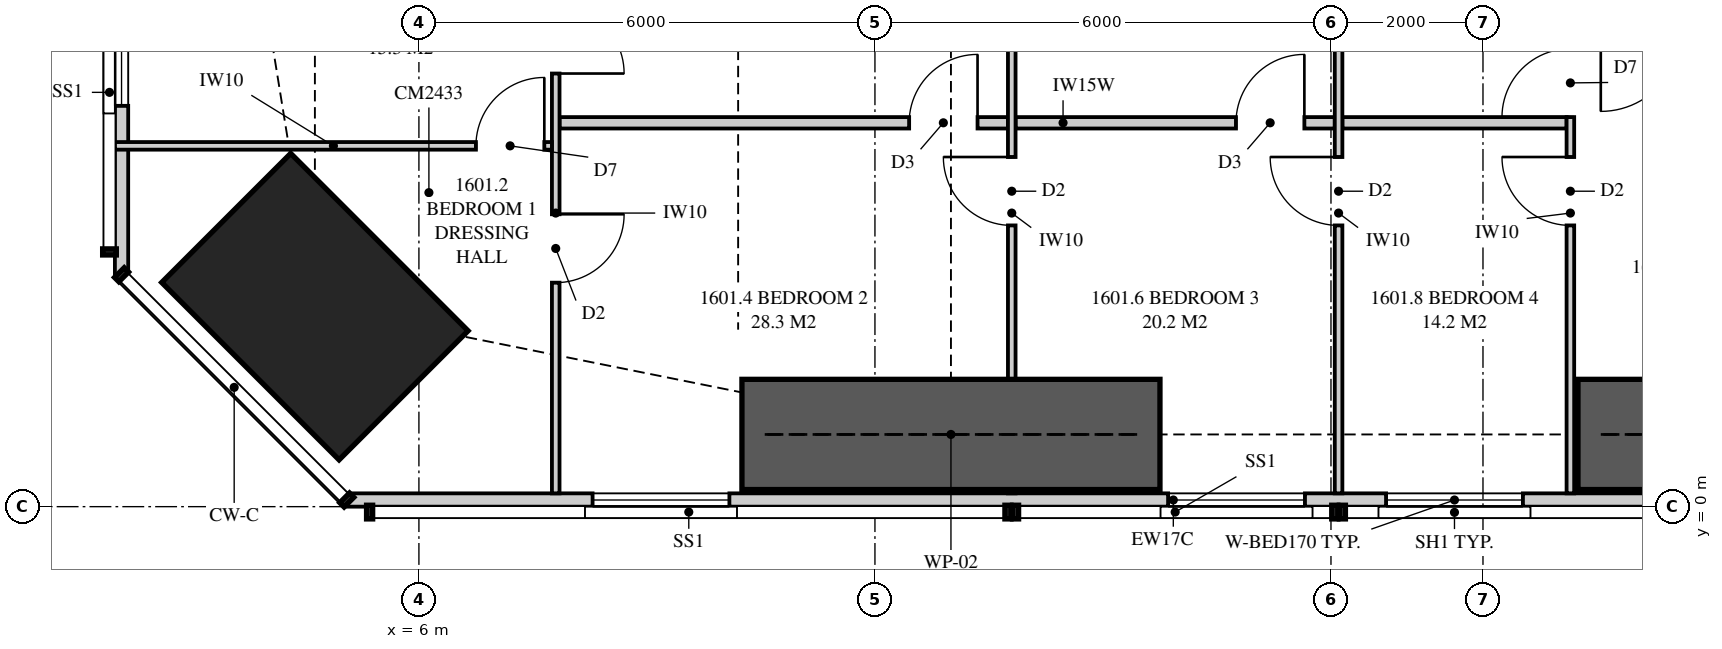
"""IFC4 building model, lengths in metres.
Left out: names, types, materials, properties, quantities, classifications, styles, units other than length and angle.
Written with IfcOpenShell. Run it as: python <this file> out.ifc"""

import sys

from ifc_helpers import new_model, si_unit, direction, frame, frame_2d, origin, origin_2d, place, context, subcontext, project, spatial, polyline, rectangle, outline, extrude, element, fill, save


model = new_model("IFC4")
c1 = context("Model", 3, precision=1e-05, world=origin(), true_north=direction((0.0, 1.0)))
c2 = subcontext(c1, "Body", "Model", "MODEL_VIEW")
j1 = project(units=[si_unit("LENGTHUNIT", "METRE"), si_unit("PLANEANGLEUNIT", "RADIAN")], contexts=[c1])
p1 = place(None, origin())
s1 = spatial("IfcSite", under=j1, at=p1, CompositionType="ELEMENT")
p2 = place(p1, origin())
s2 = spatial("IfcBuilding", under=s1, at=p2, CompositionType="ELEMENT")
p3 = place(p2, frame((0.0, 0.0, 61.2)))
s3 = spatial("IfcBuildingStorey", under=s2, at=p3, CompositionType="ELEMENT", Elevation=61.2)
p4 = place(p3, frame((4.631, 2.631, 0.0), z_axis=(0.0, 0.0, 1.0), x_axis=(0.707106781187, 0.707106781187, 0.0)))
e1 = element("IfcColumn", 1, at=p4, inside=s3, PredefinedType="COLUMN", context=c2, shape_type="SweptSolid", body=[
    extrude(rectangle(XDim=2.4, YDim=3.3, at=origin_2d()), origin(), (0.0, 0.0, 1.0), 3.35),
])
p5 = place(p3, frame((5.051, 0.087, 0.0), z_axis=(0.0, 0.0, 1.0), x_axis=(1.0, 0.0, 0.0)))
e2 = element("IfcWall", 2, at=p5, inside=s3, PredefinedType="SOLIDWALL", context=c2, shape_type="SweptSolid", body=[
    extrude(outline(polyline([(0.0, 0.0), (21.749, 0.0), (21.749, 2.15), (7.949, 2.15), (7.949, 3.11), (7.793, 3.11), (7.793, 2.15), (7.745, 2.15), (7.745, 3.11), (0.0, 3.11), (0.0, 0.0)])), frame((0.0, 0.087, 0.0), z_axis=(0.0, -1.0, 0.0), x_axis=(1.0, 0.0, 0.0)), (0.0, 0.0, 1.0), 0.175),
])
p6 = place(p5, frame((3.234, 0.0, 0.4)))
e3 = element("IfcOpeningElement", 3, at=p6, cuts=e2, PredefinedType="OPENING", context=c2, shape_type="SweptSolid", body=[
    extrude(rectangle(XDim=1.8, YDim=1.7, at=frame_2d((0.9, 0.85))), frame((0.0, 0.097, 0.0), z_axis=(0.0, -1.0, 0.0), x_axis=(1.0, 0.0, 0.0)), (0.0, 0.0, 1.0), 0.195),
])
p7 = place(p5, frame((10.806, 0.0, 0.4)))
e4 = element("IfcOpeningElement", 4, at=p7, cuts=e2, PredefinedType="OPENING", context=c2, shape_type="SweptSolid", body=[
    extrude(rectangle(XDim=1.8, YDim=1.7, at=frame_2d((0.9, 0.85))), frame((0.0, 0.097, 0.0), z_axis=(0.0, -1.0, 0.0), x_axis=(1.0, 0.0, 0.0)), (0.0, 0.0, 1.0), 0.195),
])
p8 = place(p5, frame((13.674, 0.0, 0.4)))
e5 = element("IfcOpeningElement", 5, at=p8, cuts=e2, PredefinedType="OPENING", context=c2, shape_type="SweptSolid", body=[
    extrude(rectangle(XDim=1.8, YDim=1.7, at=frame_2d((0.9, 0.85))), frame((0.0, 0.097, 0.0), z_axis=(0.0, -1.0, 0.0), x_axis=(1.0, 0.0, 0.0)), (0.0, 0.0, 1.0), 0.195),
])
p9 = place(p3, frame((2.087, 16.3, 0.0), z_axis=(0.0, 0.0, 1.0), x_axis=(0.0, -1.0, 0.0)))
e6 = element("IfcWall", 6, at=p9, inside=s3, PredefinedType="SOLIDWALL", context=c2, shape_type="SweptSolid", body=[
    extrude(outline(polyline([(0.0, 0.0), (13.249, 0.0), (13.249, 3.11), (3.519, 3.11), (3.519, 2.15), (3.426, 2.15), (3.426, 3.11), (3.3, 3.11), (3.3, 2.15), (0.0, 2.15), (0.0, 0.0)])), frame((0.0, 0.087, 0.0), z_axis=(0.0, -1.0, 0.0), x_axis=(1.0, 0.0, 0.0)), (0.0, 0.0, 1.0), 0.175),
])
p10 = place(p9, frame((6.175, 0.0, 0.4)))
e7 = element("IfcOpeningElement", 7, at=p10, cuts=e6, PredefinedType="OPENING", context=c2, shape_type="SweptSolid", body=[
    extrude(rectangle(XDim=1.8, YDim=1.7, at=frame_2d((0.9, 0.85))), frame((0.0, 0.097, 0.0), z_axis=(0.0, -1.0, 0.0), x_axis=(1.0, 0.0, 0.0)), (0.0, 0.0, 1.0), 0.195),
])
p11 = place(p9, frame((9.227, 0.0, 0.4)))
e8 = element("IfcOpeningElement", 8, at=p11, cuts=e6, PredefinedType="OPENING", context=c2, shape_type="SweptSolid", body=[
    extrude(rectangle(XDim=1.8, YDim=1.7, at=frame_2d((0.9, 0.85))), frame((0.0, 0.097, 0.0), z_axis=(0.0, -1.0, 0.0), x_axis=(1.0, 0.0, 0.0)), (0.0, 0.0, 1.0), 0.195),
])
p12 = place(p3, frame((7.8, 0.175, 0.0), z_axis=(0.0, 0.0, 1.0), x_axis=(0.0, 1.0, 0.0)))
e9 = element("IfcWall", 9, at=p12, inside=s3, PredefinedType="PARTITIONING", context=c2, shape_type="SweptSolid", body=[
    extrude(outline(polyline([(0.0, 0.0), (7.375, 0.0), (7.375, 3.11), (2.697, 3.11), (2.697, 2.15), (0.943, 2.15), (0.943, 3.11), (0.0, 3.11), (0.0, 0.0)])), frame((0.0, 0.05, 0.0), z_axis=(0.0, -1.0, 0.0), x_axis=(1.0, 0.0, 0.0)), (0.0, 0.0, 1.0), 0.1),
])
p13 = place(p12, frame((2.772, 0.0, 0.0)))
e10 = element("IfcOpeningElement", 10, at=p13, cuts=e9, PredefinedType="OPENING", context=c2, shape_type="SweptSolid", body=[
    extrude(rectangle(XDim=0.9, YDim=2.1, at=frame_2d((0.45, 1.05))), frame((0.0, 0.06, 0.0), z_axis=(0.0, -1.0, 0.0), x_axis=(1.0, 0.0, 0.0)), (0.0, 0.0, 1.0), 0.12),
])
p14 = place(p12, frame((5.523, 0.0, 0.0)))
e11 = element("IfcOpeningElement", 11, at=p14, cuts=e9, PredefinedType="OPENING", context=c2, shape_type="SweptSolid", body=[
    extrude(rectangle(XDim=0.9, YDim=2.1, at=frame_2d((0.45, 1.05))), frame((0.0, 0.06, 0.0), z_axis=(0.0, -1.0, 0.0), x_axis=(1.0, 0.0, 0.0)), (0.0, 0.0, 1.0), 0.12),
])
p15 = place(p3, frame((13.8, 0.175, 0.0), z_axis=(0.0, 0.0, 1.0), x_axis=(0.0, 1.0, 0.0)))
e12 = element("IfcWall", 12, at=p15, inside=s3, PredefinedType="PARTITIONING", context=c2, shape_type="SweptSolid", body=[
    extrude(outline(polyline([(1.635, 2.15), (0.0, 2.15), (0.0, 0.0), (7.375, 0.0), (7.375, 3.11), (1.635, 3.11), (1.635, 2.15)]), holes=[polyline([(1.021, 0.133), (0.529, 0.133), (0.529, 0.923), (1.021, 0.923), (1.021, 0.133)]), polyline([(1.021, 1.227), (0.529, 1.227), (0.529, 2.017), (1.021, 2.017), (1.021, 1.227)])]), frame((0.0, 0.05, 0.0), z_axis=(0.0, -1.0, 0.0), x_axis=(1.0, 0.0, 0.0)), (0.0, 0.0, 1.0), 0.1),
])
p16 = place(p15, frame((3.525, 0.0, 0.0)))
e13 = element("IfcOpeningElement", 13, at=p16, cuts=e12, PredefinedType="OPENING", context=c2, shape_type="SweptSolid", body=[
    extrude(rectangle(XDim=0.9, YDim=2.1, at=frame_2d((0.45, 1.05))), frame((0.0, 0.06, 0.0), z_axis=(0.0, -1.0, 0.0), x_axis=(1.0, 0.0, 0.0)), (0.0, 0.0, 1.0), 0.12),
])
p17 = place(p3, frame((18.1, 0.175, 0.0), z_axis=(0.0, 0.0, 1.0), x_axis=(0.0, 1.0, 0.0)))
e14 = element("IfcWall", 14, at=p17, inside=s3, PredefinedType="PARTITIONING", context=c2, shape_type="SweptSolid", body=[
    extrude(outline(polyline([(0.0, 0.0), (7.375, 0.0), (7.375, 3.11), (1.635, 3.11), (1.635, 2.15), (0.0, 2.15), (0.0, 3.11), (0.0, 0.0)])), frame((0.0, 0.05, 0.0), z_axis=(0.0, -1.0, 0.0), x_axis=(1.0, 0.0, 0.0)), (0.0, 0.0, 1.0), 0.1),
])
p18 = place(p17, frame((3.525, 0.0, 0.0)))
e15 = element("IfcOpeningElement", 15, at=p18, cuts=e14, PredefinedType="OPENING", context=c2, shape_type="SweptSolid", body=[
    extrude(rectangle(XDim=0.9, YDim=2.1, at=frame_2d((0.45, 1.05))), frame((0.0, 0.06, 0.0), z_axis=(0.0, -1.0, 0.0), x_axis=(1.0, 0.0, 0.0)), (0.0, 0.0, 1.0), 0.12),
])
p19 = place(p3, frame((21.15, 0.175, 0.0), z_axis=(0.0, 0.0, 1.0), x_axis=(0.0, 1.0, 0.0)))
e16 = element("IfcWall", 16, at=p19, inside=s3, PredefinedType="PARTITIONING", context=c2, shape_type="SweptSolid", body=[
    extrude(outline(polyline([(0.0, 0.0), (7.375, 0.0), (7.375, 3.11), (1.635, 3.11), (1.635, 2.15), (0.0, 2.15), (0.0, 3.11), (0.0, 0.0)])), frame((0.0, 0.05, 0.0), z_axis=(0.0, -1.0, 0.0), x_axis=(1.0, 0.0, 0.0)), (0.0, 0.0, 1.0), 0.1),
])
p20 = place(p19, frame((3.525, 0.0, 0.0)))
e17 = element("IfcOpeningElement", 17, at=p20, cuts=e16, PredefinedType="OPENING", context=c2, shape_type="SweptSolid", body=[
    extrude(rectangle(XDim=0.9, YDim=2.1, at=frame_2d((0.45, 1.05))), frame((0.0, 0.06, 0.0), z_axis=(0.0, -1.0, 0.0), x_axis=(1.0, 0.0, 0.0)), (0.0, 0.0, 1.0), 0.12),
])
p21 = place(p19, frame((4.95, 0.0, 0.0)))
e18 = element("IfcOpeningElement", 18, at=p21, cuts=e16, PredefinedType="OPENING", context=c2, shape_type="SweptSolid", body=[
    extrude(rectangle(XDim=0.9, YDim=2.1, at=frame_2d((0.45, 1.05))), frame((0.0, 0.06, 0.0), z_axis=(0.0, -1.0, 0.0), x_axis=(1.0, 0.0, 0.0)), (0.0, 0.0, 1.0), 0.12),
])
p22 = place(p3, frame((2.0, 4.747, 0.0), z_axis=(0.0, 0.0, 1.0), x_axis=(1.0, 0.0, 0.0)))
e19 = element("IfcWall", 19, at=p22, inside=s3, PredefinedType="PARTITIONING", context=c2, shape_type="SweptSolid", body=[
    extrude(outline(polyline([(0.0, 0.0), (5.75, 0.0), (5.75, 3.11), (3.16, 3.11), (3.16, 2.15), (1.417, 2.15), (1.417, 3.11), (0.0, 3.11), (0.0, 0.0)])), frame((0.0, 0.05, 0.0), z_axis=(0.0, -1.0, 0.0), x_axis=(1.0, 0.0, 0.0)), (0.0, 0.0, 1.0), 0.1),
])
p23 = place(p22, frame((4.75, 0.0, 0.0)))
e20 = element("IfcOpeningElement", 20, at=p23, cuts=e19, PredefinedType="OPENING", context=c2, shape_type="SweptSolid", body=[
    extrude(rectangle(XDim=0.9, YDim=2.1, at=frame_2d((0.45, 1.05))), frame((0.0, 0.06, 0.0), z_axis=(0.0, -1.0, 0.0), x_axis=(1.0, 0.0, 0.0)), (0.0, 0.0, 1.0), 0.12),
])
p24 = place(p3, frame((7.85, 5.05, 0.0), z_axis=(0.0, 0.0, 1.0), x_axis=(1.0, 0.0, 0.0)))
e21 = element("IfcWall", 21, at=p24, inside=s3, PredefinedType="PLUMBINGWALL", context=c2, shape_type="SweptSolid", body=[
    extrude(outline(polyline([(0.0, 0.0), (5.9, 0.0), (5.9, 3.11), (5.462, 3.11), (5.462, 2.541), (4.838, 2.541), (4.838, 3.11), (3.635, 3.11), (3.635, 2.51), (1.065, 2.51), (1.065, 3.11), (0.0, 3.11), (0.0, 0.0)])), frame((0.0, 0.075, 0.0), z_axis=(0.0, -1.0, 0.0), x_axis=(1.0, 0.0, 0.0)), (0.0, 0.0, 1.0), 0.15),
])
p25 = place(p24, frame((4.6, 0.0, 0.0)))
e22 = element("IfcOpeningElement", 22, at=p25, cuts=e21, PredefinedType="OPENING", context=c2, shape_type="SweptSolid", body=[
    extrude(rectangle(XDim=0.9, YDim=2.1, at=frame_2d((0.45, 1.05))), frame((0.0, 0.085, 0.0), z_axis=(0.0, -1.0, 0.0), x_axis=(1.0, 0.0, 0.0)), (0.0, 0.0, 1.0), 0.17),
])
p26 = place(p3, frame((13.85, 5.05, 0.0), z_axis=(0.0, 0.0, 1.0), x_axis=(1.0, 0.0, 0.0)))
e23 = element("IfcWall", 23, at=p26, inside=s3, PredefinedType="PLUMBINGWALL", context=c2, shape_type="SweptSolid", body=[
    extrude(rectangle(XDim=4.2, YDim=0.15, at=frame_2d((2.1, 0.0))), origin(), (0.0, 0.0, 1.0), 3.11),
])
p27 = place(p26, frame((2.9, 0.0, 0.0)))
e24 = element("IfcOpeningElement", 24, at=p27, cuts=e23, PredefinedType="OPENING", context=c2, shape_type="SweptSolid", body=[
    extrude(rectangle(XDim=0.9, YDim=2.1, at=frame_2d((0.45, 1.05))), frame((0.0, 0.085, 0.0), z_axis=(0.0, -1.0, 0.0), x_axis=(1.0, 0.0, 0.0)), (0.0, 0.0, 1.0), 0.17),
])
p28 = place(p3, frame((18.15, 5.05, 0.0), z_axis=(0.0, 0.0, 1.0), x_axis=(1.0, 0.0, 0.0)))
e25 = element("IfcWall", 25, at=p28, inside=s3, PredefinedType="PLUMBINGWALL", context=c2, shape_type="SweptSolid", body=[
    extrude(rectangle(XDim=2.95, YDim=0.15, at=frame_2d((1.475, 0.0))), origin(), (0.0, 0.0, 1.0), 3.11),
])
for number, where, z_axis, x_axis in (
    (26, (10.25, 0.95, 0.0), (0.0, 0.0, 1.0), (1.0, 0.0, 0.0)),
    (27, (21.25, 0.95, 0.0), (0.0, 0.0, 1.0), (1.0, 0.0, 0.0)),
):
    element("IfcWall", number, at=place(p3, frame(where, z_axis=z_axis, x_axis=x_axis)), inside=s3, PredefinedType="SHEAR", context=c2, shape_type="SweptSolid", body=[
        extrude(rectangle(XDim=5.5, YDim=1.45, at=frame_2d((2.75, 0.0))), origin(), (0.0, 0.0, 1.0), 3.35),
    ])
p29 = place(p6, origin())
e28 = element("IfcWindow", 28, at=p29, inside=s3, PartitioningType="SINGLE_PANEL", PredefinedType="WINDOW", context=c2, shape_type="SweptSolid", body=[
    extrude(rectangle(XDim=1.8, YDim=1.7, at=frame_2d((0.9, 0.85))), frame((0.0, 0.03, 0.0), z_axis=(0.0, -1.0, 0.0), x_axis=(1.0, 0.0, 0.0)), (0.0, 0.0, 1.0), 0.06),
])
fill(e3, e28)
p30 = place(p7, origin())
e29 = element("IfcWindow", 29, at=p30, inside=s3, PartitioningType="SINGLE_PANEL", PredefinedType="WINDOW", context=c2, shape_type="SweptSolid", body=[
    extrude(rectangle(XDim=1.8, YDim=1.7, at=frame_2d((0.9, 0.85))), frame((0.0, 0.03, 0.0), z_axis=(0.0, -1.0, 0.0), x_axis=(1.0, 0.0, 0.0)), (0.0, 0.0, 1.0), 0.06),
])
fill(e4, e29)
p31 = place(p8, origin())
e30 = element("IfcWindow", 30, at=p31, inside=s3, PartitioningType="SINGLE_PANEL", PredefinedType="WINDOW", context=c2, shape_type="SweptSolid", body=[
    extrude(rectangle(XDim=1.8, YDim=1.7, at=frame_2d((0.9, 0.85))), frame((0.0, 0.03, 0.0), z_axis=(0.0, -1.0, 0.0), x_axis=(1.0, 0.0, 0.0)), (0.0, 0.0, 1.0), 0.06),
])
fill(e5, e30)
p32 = place(p11, origin())
e31 = element("IfcWindow", 31, at=p32, inside=s3, PartitioningType="SINGLE_PANEL", PredefinedType="WINDOW", context=c2, shape_type="SweptSolid", body=[
    extrude(rectangle(XDim=1.8, YDim=1.7, at=frame_2d((0.9, 0.85))), frame((0.0, 0.03, 0.0), z_axis=(0.0, -1.0, 0.0), x_axis=(1.0, 0.0, 0.0)), (0.0, 0.0, 1.0), 0.06),
])
fill(e8, e31)
p33 = place(p23, origin())
e32 = element("IfcDoor", 32, at=p33, inside=s3, OperationType="SINGLE_SWING_RIGHT", PredefinedType="DOOR", context=c2, shape_type="SweptSolid", body=[
    extrude(rectangle(XDim=0.9, YDim=2.1, at=frame_2d((0.45, 1.05))), frame((0.0, 0.025, 0.0), z_axis=(0.0, -1.0, 0.0), x_axis=(1.0, 0.0, 0.0)), (0.0, 0.0, 1.0), 0.05),
])
fill(e20, e32)
p34 = place(p13, frame((0.9, 0.0, 0.0), z_axis=(0.0, 0.0, 1.0), x_axis=(-1.0, 0.0, 0.0)))
e33 = element("IfcDoor", 33, at=p34, inside=s3, OperationType="SINGLE_SWING_LEFT", PredefinedType="DOOR", context=c2, shape_type="SweptSolid", body=[
    extrude(rectangle(XDim=0.9, YDim=2.1, at=frame_2d((0.45, 1.05))), frame((0.0, 0.025, 0.0), z_axis=(0.0, -1.0, 0.0), x_axis=(1.0, 0.0, 0.0)), (0.0, 0.0, 1.0), 0.05),
])
fill(e10, e33)
p35 = place(p16, origin())
e34 = element("IfcDoor", 34, at=p35, inside=s3, OperationType="SINGLE_SWING_RIGHT", PredefinedType="DOOR", context=c2, shape_type="SweptSolid", body=[
    extrude(rectangle(XDim=0.9, YDim=2.1, at=frame_2d((0.45, 1.05))), frame((0.0, 0.025, 0.0), z_axis=(0.0, -1.0, 0.0), x_axis=(1.0, 0.0, 0.0)), (0.0, 0.0, 1.0), 0.05),
])
fill(e13, e34)
p36 = place(p25, origin())
e35 = element("IfcDoor", 35, at=p36, inside=s3, OperationType="SINGLE_SWING_RIGHT", PredefinedType="DOOR", context=c2, shape_type="SweptSolid", body=[
    extrude(rectangle(XDim=0.9, YDim=2.1, at=frame_2d((0.45, 1.05))), frame((0.0, 0.025, 0.0), z_axis=(0.0, -1.0, 0.0), x_axis=(1.0, 0.0, 0.0)), (0.0, 0.0, 1.0), 0.05),
])
fill(e22, e35)
p37 = place(p18, origin())
e36 = element("IfcDoor", 36, at=p37, inside=s3, OperationType="SINGLE_SWING_RIGHT", PredefinedType="DOOR", context=c2, shape_type="SweptSolid", body=[
    extrude(rectangle(XDim=0.9, YDim=2.1, at=frame_2d((0.45, 1.05))), frame((0.0, 0.025, 0.0), z_axis=(0.0, -1.0, 0.0), x_axis=(1.0, 0.0, 0.0)), (0.0, 0.0, 1.0), 0.05),
])
fill(e15, e36)
p38 = place(p27, origin())
e37 = element("IfcDoor", 37, at=p38, inside=s3, OperationType="SINGLE_SWING_RIGHT", PredefinedType="DOOR", context=c2, shape_type="SweptSolid", body=[
    extrude(rectangle(XDim=0.9, YDim=2.1, at=frame_2d((0.45, 1.05))), frame((0.0, 0.025, 0.0), z_axis=(0.0, -1.0, 0.0), x_axis=(1.0, 0.0, 0.0)), (0.0, 0.0, 1.0), 0.05),
])
fill(e24, e37)
p39 = place(p20, origin())
e38 = element("IfcDoor", 38, at=p39, inside=s3, OperationType="SINGLE_SWING_RIGHT", PredefinedType="DOOR", context=c2, shape_type="SweptSolid", body=[
    extrude(rectangle(XDim=0.9, YDim=2.1, at=frame_2d((0.45, 1.05))), frame((0.0, 0.025, 0.0), z_axis=(0.0, -1.0, 0.0), x_axis=(1.0, 0.0, 0.0)), (0.0, 0.0, 1.0), 0.05),
])
fill(e17, e38)
p40 = place(p21, origin())
e39 = element("IfcDoor", 39, at=p40, inside=s3, OperationType="SINGLE_SWING_LEFT", PredefinedType="DOOR", context=c2, shape_type="SweptSolid", body=[
    extrude(rectangle(XDim=0.9, YDim=2.1, at=frame_2d((0.45, 1.05))), frame((0.0, 0.025, 0.0), z_axis=(0.0, -1.0, 0.0), x_axis=(1.0, 0.0, 0.0)), (0.0, 0.0, 1.0), 0.05),
])
fill(e18, e39)
p41 = place(p14, frame((0.9, 0.0, 0.0), z_axis=(0.0, 0.0, 1.0), x_axis=(-1.0, 0.0, 0.0)))
e40 = element("IfcDoor", 40, at=p41, inside=s3, OperationType="SINGLE_SWING_RIGHT", PredefinedType="DOOR", context=c2, shape_type="SweptSolid", body=[
    extrude(rectangle(XDim=0.9, YDim=2.1, at=frame_2d((0.45, 1.05))), frame((0.0, 0.025, 0.0), z_axis=(0.0, -1.0, 0.0), x_axis=(1.0, 0.0, 0.0)), (0.0, 0.0, 1.0), 0.05),
])
fill(e11, e40)
save(model, sys.argv[1])
